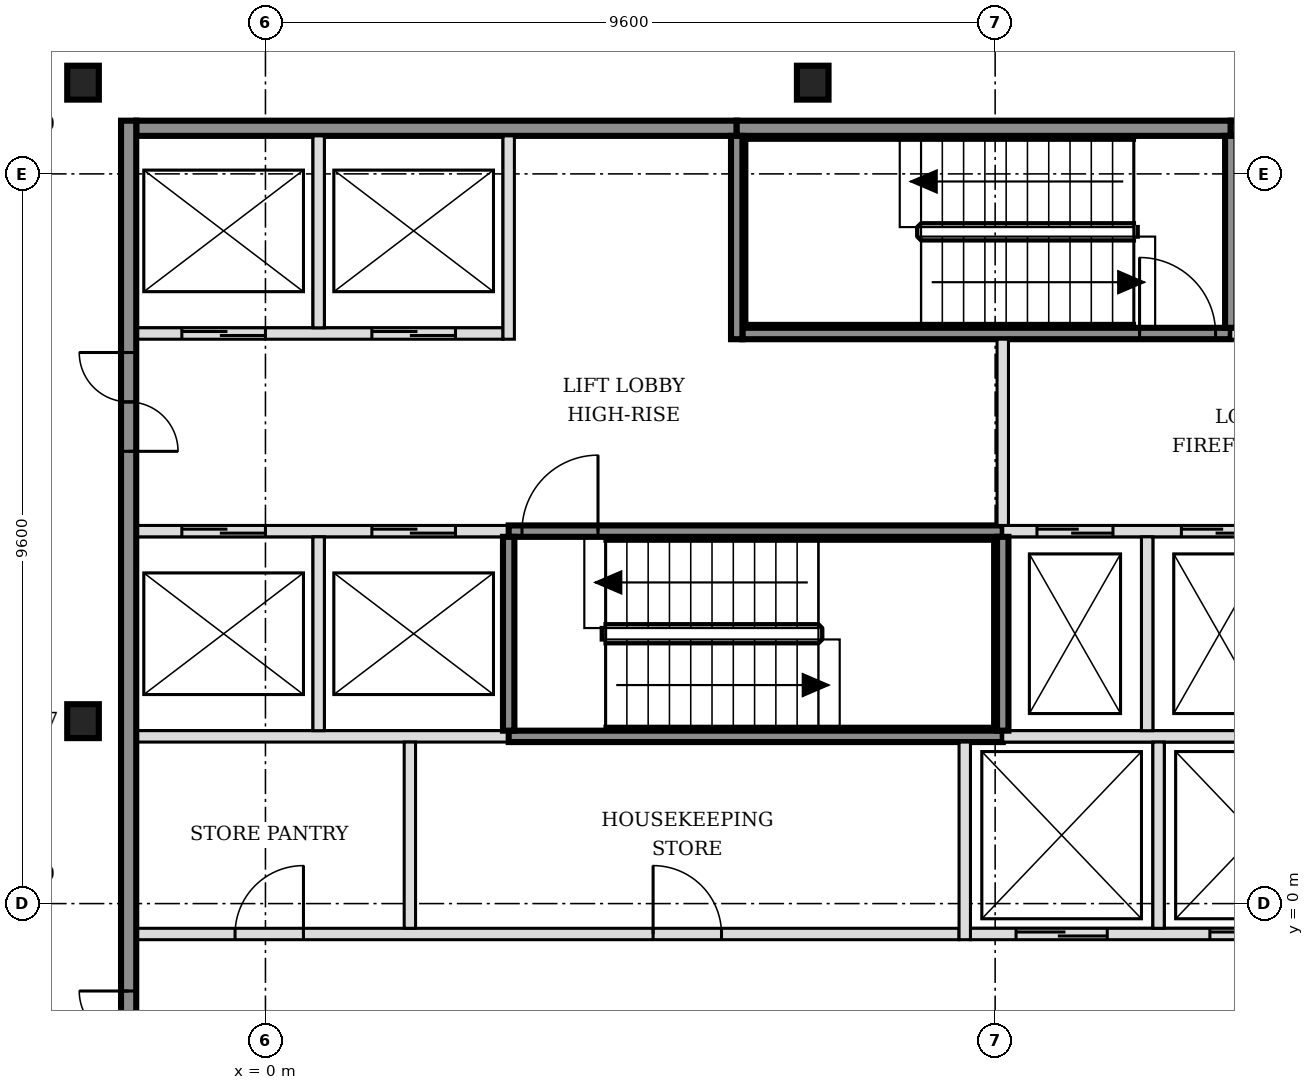
"""IFC4 building model, lengths in metres.
Left out: names, types, materials, properties, quantities, classifications, styles, units other than length and angle.
Written with IfcOpenShell. Run it as: python <this file> out.ifc"""

import sys

from ifc_helpers import new_model, si_unit, direction, frame, frame_2d, origin, origin_2d, place, context, subcontext, project, spatial, rectangle, i_section, extrude, element, fill, save


model = new_model("IFC4")
c1 = context("Model", 3, precision=1e-05, world=origin(), true_north=direction((0.0, 1.0)))
c2 = subcontext(c1, "Body", "Model", "MODEL_VIEW")
j1 = project(units=[si_unit("LENGTHUNIT", "METRE"), si_unit("PLANEANGLEUNIT", "RADIAN")], contexts=[c1])
p1 = place(None, origin())
s1 = spatial("IfcSite", under=j1, at=p1, CompositionType="ELEMENT")
p2 = place(p1, origin())
s2 = spatial("IfcBuilding", under=s1, at=p2, CompositionType="ELEMENT")
p3 = place(p2, frame((0.0, 0.0, 168.6)))
s3 = spatial("IfcBuildingStorey", under=s2, at=p3, CompositionType="ELEMENT", Elevation=168.6)
for number, where, z_axis, x_axis in (
    (1, (-2.4, 2.4, -0.15), (0.0, 0.0, 1.0), (1.0, 0.0, 0.0)),
    (2, (-2.4, 10.8, -0.15), (0.0, 0.0, 1.0), (1.0, 0.0, 0.0)),
    (3, (7.2, 10.8, -0.15), (0.0, 0.0, 1.0), (1.0, 0.0, 0.0)),
):
    element("IfcColumn", number, at=place(p3, frame(where, z_axis=z_axis, x_axis=x_axis)), inside=s3, PredefinedType="COLUMN", context=c2, shape_type="SweptSolid", body=[
        extrude(i_section(OverallWidth=0.416, OverallDepth=0.446, WebThickness=0.039, FlangeThickness=0.063, FilletRadius=0.015, at=origin_2d()), origin(), (0.0, 0.0, 1.0), 3.6),
    ])
p4 = place(p3, frame((-1.7, -0.4, 0.0), z_axis=(0.0, 0.0, 1.0), x_axis=(1.0, 0.0, 0.0)))
e4 = element("IfcWall", 4, at=p4, inside=s3, PredefinedType="PARTITIONING", context=c2, shape_type="SweptSolid", body=[
    extrude(rectangle(XDim=10.825, YDim=0.15, at=frame_2d((5.413, 0.0))), origin(), (0.0, 0.0, 1.0), 3.45),
])
p5 = place(p4, frame((1.3, 0.0, 0.0)))
e5 = element("IfcOpeningElement", 5, at=p5, cuts=e4, PredefinedType="OPENING", context=c2, shape_type="SweptSolid", body=[
    extrude(rectangle(XDim=0.9, YDim=2.1, at=frame_2d((0.45, 1.05))), frame((0.0, 0.085, 0.0), z_axis=(0.0, -1.0, 0.0), x_axis=(1.0, 0.0, 0.0)), (0.0, 0.0, 1.0), 0.17),
])
p6 = place(p4, frame((6.8, 0.0, 0.0)))
e6 = element("IfcOpeningElement", 6, at=p6, cuts=e4, PredefinedType="OPENING", context=c2, shape_type="SweptSolid", body=[
    extrude(rectangle(XDim=0.9, YDim=2.1, at=frame_2d((0.45, 1.05))), frame((0.0, 0.085, 0.0), z_axis=(0.0, -1.0, 0.0), x_axis=(1.0, 0.0, 0.0)), (0.0, 0.0, 1.0), 0.17),
])
p7 = place(p3, frame((9.275, -0.4, 0.0), z_axis=(0.0, 0.0, 1.0), x_axis=(1.0, 0.0, 0.0)))
e7 = element("IfcWall", 7, at=p7, inside=s3, PredefinedType="SOLIDWALL", context=c2, shape_type="SweptSolid", body=[
    extrude(rectangle(XDim=4.95, YDim=0.15, at=frame_2d((2.475, 0.0))), origin(), (0.0, 0.0, 1.0), 3.45),
])
p8 = place(p7, frame((0.6, 0.0, 0.0)))
e8 = element("IfcOpeningElement", 8, at=p8, cuts=e7, PredefinedType="OPENING", context=c2, shape_type="SweptSolid", body=[
    extrude(rectangle(XDim=1.2, YDim=2.1, at=frame_2d((0.6, 1.05))), frame((0.0, 0.085, 0.0), z_axis=(0.0, -1.0, 0.0), x_axis=(1.0, 0.0, 0.0)), (0.0, 0.0, 1.0), 0.17),
])
p9 = place(p7, frame((3.15, 0.0, 0.0)))
e9 = element("IfcOpeningElement", 9, at=p9, cuts=e7, PredefinedType="OPENING", context=c2, shape_type="SweptSolid", body=[
    extrude(rectangle(XDim=1.2, YDim=2.1, at=frame_2d((0.6, 1.05))), frame((0.0, 0.085, 0.0), z_axis=(0.0, -1.0, 0.0), x_axis=(1.0, 0.0, 0.0)), (0.0, 0.0, 1.0), 0.17),
])
p10 = place(p3, frame((-1.7, 2.2, 0.0), z_axis=(0.0, 0.0, 1.0), x_axis=(1.0, 0.0, 0.0)))
e10 = element("IfcWall", 10, at=p10, inside=s3, PredefinedType="SOLIDWALL", context=c2, shape_type="SweptSolid", body=[
    extrude(rectangle(XDim=4.9, YDim=0.15, at=frame_2d((2.45, 0.0))), origin(), (0.0, 0.0, 1.0), 3.45),
])
p11 = place(p3, frame((3.2, 2.2, 0.0), z_axis=(0.0, 0.0, 1.0), x_axis=(1.0, 0.0, 0.0)))
e11 = element("IfcWall", 11, at=p11, inside=s3, PredefinedType="SOLIDWALL", context=c2, shape_type="SweptSolid", body=[
    extrude(rectangle(XDim=6.5, YDim=0.15, at=frame_2d((3.25, 0.0))), origin(), (0.0, 0.0, 1.0), 3.45),
])
p12 = place(p3, frame((9.7, 2.2, 0.0), z_axis=(0.0, 0.0, 1.0), x_axis=(1.0, 0.0, 0.0)))
e12 = element("IfcWall", 12, at=p12, inside=s3, PredefinedType="SOLIDWALL", context=c2, shape_type="SweptSolid", body=[
    extrude(rectangle(XDim=4.525, YDim=0.15, at=frame_2d((2.263, 0.0))), origin(), (0.0, 0.0, 1.0), 3.45),
])
p13 = place(p3, frame((-1.7, 4.9, 0.0), z_axis=(0.0, 0.0, 1.0), x_axis=(1.0, 0.0, 0.0)))
e13 = element("IfcWall", 13, at=p13, inside=s3, PredefinedType="SOLIDWALL", context=c2, shape_type="SweptSolid", body=[
    extrude(rectangle(XDim=4.9, YDim=0.15, at=frame_2d((2.45, 0.0))), origin(), (0.0, 0.0, 1.0), 3.45),
])
p14 = place(p13, frame((0.6, 0.0, 0.0)))
e14 = element("IfcOpeningElement", 14, at=p14, cuts=e13, PredefinedType="OPENING", context=c2, shape_type="SweptSolid", body=[
    extrude(rectangle(XDim=1.1, YDim=2.1, at=frame_2d((0.55, 1.05))), frame((0.0, 0.085, 0.0), z_axis=(0.0, -1.0, 0.0), x_axis=(1.0, 0.0, 0.0)), (0.0, 0.0, 1.0), 0.17),
])
p15 = place(p13, frame((3.1, 0.0, 0.0)))
e15 = element("IfcOpeningElement", 15, at=p15, cuts=e13, PredefinedType="OPENING", context=c2, shape_type="SweptSolid", body=[
    extrude(rectangle(XDim=1.1, YDim=2.1, at=frame_2d((0.55, 1.05))), frame((0.0, 0.085, 0.0), z_axis=(0.0, -1.0, 0.0), x_axis=(1.0, 0.0, 0.0)), (0.0, 0.0, 1.0), 0.17),
])
p16 = place(p3, frame((3.2, 4.9, 0.0), z_axis=(0.0, 0.0, 1.0), x_axis=(1.0, 0.0, 0.0)))
e16 = element("IfcWall", 16, at=p16, inside=s3, PredefinedType="SOLIDWALL", context=c2, shape_type="SweptSolid", body=[
    extrude(rectangle(XDim=6.5, YDim=0.15, at=frame_2d((3.25, 0.0))), origin(), (0.0, 0.0, 1.0), 3.45),
])
p17 = place(p16, frame((0.175, 0.0, 0.0)))
e17 = element("IfcOpeningElement", 17, at=p17, cuts=e16, PredefinedType="OPENING", context=c2, shape_type="SweptSolid", body=[
    extrude(rectangle(XDim=1.0, YDim=2.1, at=frame_2d((0.5, 1.05))), frame((0.0, 0.085, 0.0), z_axis=(0.0, -1.0, 0.0), x_axis=(1.0, 0.0, 0.0)), (0.0, 0.0, 1.0), 0.17),
])
p18 = place(p3, frame((9.7, 4.9, 0.0), z_axis=(0.0, 0.0, 1.0), x_axis=(1.0, 0.0, 0.0)))
e18 = element("IfcWall", 18, at=p18, inside=s3, PredefinedType="SOLIDWALL", context=c2, shape_type="SweptSolid", body=[
    extrude(rectangle(XDim=6.4, YDim=0.15, at=frame_2d((3.2, 0.0))), origin(), (0.0, 0.0, 1.0), 3.45),
])
p19 = place(p18, frame((0.45, 0.0, 0.0)))
e19 = element("IfcOpeningElement", 19, at=p19, cuts=e18, PredefinedType="OPENING", context=c2, shape_type="SweptSolid", body=[
    extrude(rectangle(XDim=1.0, YDim=2.1, at=frame_2d((0.5, 1.05))), frame((0.0, 0.085, 0.0), z_axis=(0.0, -1.0, 0.0), x_axis=(1.0, 0.0, 0.0)), (0.0, 0.0, 1.0), 0.17),
])
p20 = place(p18, frame((2.35, 0.0, 0.0)))
e20 = element("IfcOpeningElement", 20, at=p20, cuts=e18, PredefinedType="OPENING", context=c2, shape_type="SweptSolid", body=[
    extrude(rectangle(XDim=1.0, YDim=2.1, at=frame_2d((0.5, 1.05))), frame((0.0, 0.085, 0.0), z_axis=(0.0, -1.0, 0.0), x_axis=(1.0, 0.0, 0.0)), (0.0, 0.0, 1.0), 0.17),
])
p21 = place(p18, frame((4.7, 0.0, 0.0)))
e21 = element("IfcOpeningElement", 21, at=p21, cuts=e18, PredefinedType="OPENING", context=c2, shape_type="SweptSolid", body=[
    extrude(rectangle(XDim=0.9, YDim=2.1, at=frame_2d((0.45, 1.05))), frame((0.0, 0.085, 0.0), z_axis=(0.0, -1.0, 0.0), x_axis=(1.0, 0.0, 0.0)), (0.0, 0.0, 1.0), 0.17),
])
p22 = place(p3, frame((-1.7, 7.5, 0.0), z_axis=(0.0, 0.0, 1.0), x_axis=(1.0, 0.0, 0.0)))
e22 = element("IfcWall", 22, at=p22, inside=s3, PredefinedType="SOLIDWALL", context=c2, shape_type="SweptSolid", body=[
    extrude(rectangle(XDim=4.825, YDim=0.15, at=frame_2d((2.413, 0.0))), origin(), (0.0, 0.0, 1.0), 3.45),
])
p23 = place(p22, frame((0.6, 0.0, 0.0)))
e23 = element("IfcOpeningElement", 23, at=p23, cuts=e22, PredefinedType="OPENING", context=c2, shape_type="SweptSolid", body=[
    extrude(rectangle(XDim=1.1, YDim=2.1, at=frame_2d((0.55, 1.05))), frame((0.0, 0.085, 0.0), z_axis=(0.0, -1.0, 0.0), x_axis=(1.0, 0.0, 0.0)), (0.0, 0.0, 1.0), 0.17),
])
p24 = place(p22, frame((3.1, 0.0, 0.0)))
e24 = element("IfcOpeningElement", 24, at=p24, cuts=e22, PredefinedType="OPENING", context=c2, shape_type="SweptSolid", body=[
    extrude(rectangle(XDim=1.1, YDim=2.1, at=frame_2d((0.55, 1.05))), frame((0.0, 0.085, 0.0), z_axis=(0.0, -1.0, 0.0), x_axis=(1.0, 0.0, 0.0)), (0.0, 0.0, 1.0), 0.17),
])
p25 = place(p3, frame((6.275, 7.5, 0.0), z_axis=(0.0, 0.0, 1.0), x_axis=(1.0, 0.0, 0.0)))
e25 = element("IfcWall", 25, at=p25, inside=s3, PredefinedType="SOLIDWALL", context=c2, shape_type="SweptSolid", body=[
    extrude(rectangle(XDim=6.425, YDim=0.15, at=frame_2d((3.212, 0.0))), origin(), (0.0, 0.0, 1.0), 3.45),
])
p26 = place(p25, frame((5.225, 0.0, 0.0)))
e26 = element("IfcOpeningElement", 26, at=p26, cuts=e25, PredefinedType="OPENING", context=c2, shape_type="SweptSolid", body=[
    extrude(rectangle(XDim=1.0, YDim=2.1, at=frame_2d((0.5, 1.05))), frame((0.0, 0.085, 0.0), z_axis=(0.0, -1.0, 0.0), x_axis=(1.0, 0.0, 0.0)), (0.0, 0.0, 1.0), 0.17),
])
p27 = place(p3, frame((12.7, 7.5, 0.0), z_axis=(0.0, 0.0, 1.0), x_axis=(1.0, 0.0, 0.0)))
e27 = element("IfcWall", 27, at=p27, inside=s3, PredefinedType="SOLIDWALL", context=c2, shape_type="SweptSolid", body=[
    extrude(rectangle(XDim=3.4, YDim=0.15, at=frame_2d((1.7, 0.0))), origin(), (0.0, 0.0, 1.0), 3.45),
])
p28 = place(p27, frame((1.3, 0.0, 0.0)))
e28 = element("IfcOpeningElement", 28, at=p28, cuts=e27, PredefinedType="OPENING", context=c2, shape_type="SweptSolid", body=[
    extrude(rectangle(XDim=0.9, YDim=2.1, at=frame_2d((0.45, 1.05))), frame((0.0, 0.085, 0.0), z_axis=(0.0, -1.0, 0.0), x_axis=(1.0, 0.0, 0.0)), (0.0, 0.0, 1.0), 0.17),
])
p29 = place(p3, frame((-1.7, 10.2, 0.0), z_axis=(0.0, 0.0, 1.0), x_axis=(1.0, 0.0, 0.0)))
e29 = element("IfcWall", 29, at=p29, inside=s3, PredefinedType="SOLIDWALL", context=c2, shape_type="SweptSolid", body=[
    extrude(rectangle(XDim=7.9, YDim=0.2, at=frame_2d((3.95, 0.0))), origin(), (0.0, 0.0, 1.0), 3.45),
])
p30 = place(p3, frame((6.2, 10.2, 0.0), z_axis=(0.0, 0.0, 1.0), x_axis=(1.0, 0.0, 0.0)))
e30 = element("IfcWall", 30, at=p30, inside=s3, PredefinedType="SOLIDWALL", context=c2, shape_type="SweptSolid", body=[
    extrude(rectangle(XDim=6.5, YDim=0.2, at=frame_2d((3.25, 0.0))), origin(), (0.0, 0.0, 1.0), 3.45),
])
p31 = place(p3, frame((12.7, 10.2, 0.0), z_axis=(0.0, 0.0, 1.0), x_axis=(1.0, 0.0, 0.0)))
e31 = element("IfcWall", 31, at=p31, inside=s3, PredefinedType="SOLIDWALL", context=c2, shape_type="SweptSolid", body=[
    extrude(rectangle(XDim=3.4, YDim=0.2, at=frame_2d((1.7, 0.0))), origin(), (0.0, 0.0, 1.0), 3.45),
])
p32 = place(p3, frame((-1.8, -5.5, 0.0), z_axis=(0.0, 0.0, 1.0), x_axis=(0.0, 1.0, 0.0)))
e32 = element("IfcWall", 32, at=p32, inside=s3, PredefinedType="SOLIDWALL", context=c2, shape_type="SweptSolid", body=[
    extrude(rectangle(XDim=15.8, YDim=0.2, at=frame_2d((7.9, 0.0))), origin(), (0.0, 0.0, 1.0), 3.45),
])
p33 = place(p32, frame((3.05, 0.0, 0.0)))
e33 = element("IfcOpeningElement", 33, at=p33, cuts=e32, PredefinedType="OPENING", context=c2, shape_type="SweptSolid", body=[
    extrude(rectangle(XDim=1.3, YDim=2.1, at=frame_2d((0.65, 1.05))), frame((0.0, 0.11, 0.0), z_axis=(0.0, -1.0, 0.0), x_axis=(1.0, 0.0, 0.0)), (0.0, 0.0, 1.0), 0.22),
])
p34 = place(p32, frame((11.45, 0.0, 0.0)))
e34 = element("IfcOpeningElement", 34, at=p34, cuts=e32, PredefinedType="OPENING", context=c2, shape_type="SweptSolid", body=[
    extrude(rectangle(XDim=1.3, YDim=2.1, at=frame_2d((0.65, 1.05))), frame((0.0, 0.11, 0.0), z_axis=(0.0, -1.0, 0.0), x_axis=(1.0, 0.0, 0.0)), (0.0, 0.0, 1.0), 0.22),
])
p35 = place(p3, frame((0.7, 2.275, 0.0), z_axis=(0.0, 0.0, 1.0), x_axis=(0.0, 1.0, 0.0)))
e35 = element("IfcWall", 35, at=p35, inside=s3, PredefinedType="SOLIDWALL", context=c2, shape_type="SweptSolid", body=[
    extrude(rectangle(XDim=2.55, YDim=0.15, at=frame_2d((1.275, 0.0))), origin(), (0.0, 0.0, 1.0), 3.45),
])
p36 = place(p3, frame((0.7, 7.575, 0.0), z_axis=(0.0, 0.0, 1.0), x_axis=(0.0, 1.0, 0.0)))
e36 = element("IfcWall", 36, at=p36, inside=s3, PredefinedType="SOLIDWALL", context=c2, shape_type="SweptSolid", body=[
    extrude(rectangle(XDim=2.525, YDim=0.15, at=frame_2d((1.263, 0.0))), origin(), (0.0, 0.0, 1.0), 3.45),
])
p37 = place(p3, frame((1.9, -0.325, 0.0), z_axis=(0.0, 0.0, 1.0), x_axis=(0.0, 1.0, 0.0)))
e37 = element("IfcWall", 37, at=p37, inside=s3, PredefinedType="PARTITIONING", context=c2, shape_type="SweptSolid", body=[
    extrude(rectangle(XDim=2.45, YDim=0.15, at=frame_2d((1.225, 0.0))), origin(), (0.0, 0.0, 1.0), 3.45),
])
p38 = place(p3, frame((3.2, 2.275, 0.0), z_axis=(0.0, 0.0, 1.0), x_axis=(0.0, 1.0, 0.0)))
e38 = element("IfcWall", 38, at=p38, inside=s3, PredefinedType="SOLIDWALL", context=c2, shape_type="SweptSolid", body=[
    extrude(rectangle(XDim=2.55, YDim=0.15, at=frame_2d((1.275, 0.0))), origin(), (0.0, 0.0, 1.0), 3.45),
])
for number, where, z_axis, x_axis in (
    (39, (3.2, 7.425, 0.0), (0.0, 0.0, 1.0), (0.0, 1.0, 0.0)),
    (40, (6.2, 7.425, 0.0), (0.0, 0.0, 1.0), (0.0, 1.0, 0.0)),
):
    element("IfcWall", number, at=place(p3, frame(where, z_axis=z_axis, x_axis=x_axis)), inside=s3, PredefinedType="SOLIDWALL", context=c2, shape_type="SweptSolid", body=[
        extrude(rectangle(XDim=2.675, YDim=0.15, at=frame_2d((1.337, 0.0))), origin(), (0.0, 0.0, 1.0), 3.45),
    ])
p39 = place(p3, frame((9.2, -0.475, 0.0), z_axis=(0.0, 0.0, 1.0), x_axis=(0.0, 1.0, 0.0)))
e41 = element("IfcWall", 41, at=p39, inside=s3, PredefinedType="SOLIDWALL", context=c2, shape_type="SweptSolid", body=[
    extrude(rectangle(XDim=2.6, YDim=0.15, at=frame_2d((1.3, 0.0))), origin(), (0.0, 0.0, 1.0), 3.45),
])
p40 = place(p3, frame((9.7, 2.275, 0.0), z_axis=(0.0, 0.0, 1.0), x_axis=(0.0, 1.0, 0.0)))
e42 = element("IfcWall", 42, at=p40, inside=s3, PredefinedType="SOLIDWALL", context=c2, shape_type="SweptSolid", body=[
    extrude(rectangle(XDim=2.55, YDim=0.15, at=frame_2d((1.275, 0.0))), origin(), (0.0, 0.0, 1.0), 3.45),
])
p41 = place(p3, frame((9.7, 4.975, 0.0), z_axis=(0.0, 0.0, 1.0), x_axis=(0.0, 1.0, 0.0)))
e43 = element("IfcWall", 43, at=p41, inside=s3, PredefinedType="SOLIDWALL", context=c2, shape_type="SweptSolid", body=[
    extrude(rectangle(XDim=2.45, YDim=0.15, at=frame_2d((1.225, 0.0))), origin(), (0.0, 0.0, 1.0), 3.45),
])
p42 = place(p3, frame((11.6, 2.275, 0.0), z_axis=(0.0, 0.0, 1.0), x_axis=(0.0, 1.0, 0.0)))
e44 = element("IfcWall", 44, at=p42, inside=s3, PredefinedType="SOLIDWALL", context=c2, shape_type="SweptSolid", body=[
    extrude(rectangle(XDim=2.55, YDim=0.15, at=frame_2d((1.275, 0.0))), origin(), (0.0, 0.0, 1.0), 3.45),
])
p43 = place(p3, frame((11.75, -0.325, 0.0), z_axis=(0.0, 0.0, 1.0), x_axis=(0.0, 1.0, 0.0)))
e45 = element("IfcWall", 45, at=p43, inside=s3, PredefinedType="SOLIDWALL", context=c2, shape_type="SweptSolid", body=[
    extrude(rectangle(XDim=2.45, YDim=0.15, at=frame_2d((1.225, 0.0))), origin(), (0.0, 0.0, 1.0), 3.45),
])
p44 = place(p3, frame((12.7, 7.575, 0.0), z_axis=(0.0, 0.0, 1.0), x_axis=(0.0, 1.0, 0.0)))
e46 = element("IfcWall", 46, at=p44, inside=s3, PredefinedType="SOLIDWALL", context=c2, shape_type="SweptSolid", body=[
    extrude(rectangle(XDim=2.525, YDim=0.15, at=frame_2d((1.263, 0.0))), origin(), (0.0, 0.0, 1.0), 3.45),
])
p45 = place(p8, origin())
e47 = element("IfcDoor", 47, at=p45, inside=s3, OperationType="DOUBLE_DOOR_SLIDING", PredefinedType="DOOR", context=c2, shape_type="SweptSolid", body=[
    extrude(rectangle(XDim=1.2, YDim=2.1, at=frame_2d((0.6, 1.05))), frame((0.0, 0.025, 0.0), z_axis=(0.0, -1.0, 0.0), x_axis=(1.0, 0.0, 0.0)), (0.0, 0.0, 1.0), 0.05),
])
fill(e8, e47)
p46 = place(p9, origin())
e48 = element("IfcDoor", 48, at=p46, inside=s3, OperationType="DOUBLE_DOOR_SLIDING", PredefinedType="DOOR", context=c2, shape_type="SweptSolid", body=[
    extrude(rectangle(XDim=1.2, YDim=2.1, at=frame_2d((0.6, 1.05))), frame((0.0, 0.025, 0.0), z_axis=(0.0, -1.0, 0.0), x_axis=(1.0, 0.0, 0.0)), (0.0, 0.0, 1.0), 0.05),
])
fill(e9, e48)
p47 = place(p14, origin())
e49 = element("IfcDoor", 49, at=p47, inside=s3, OperationType="DOUBLE_DOOR_SLIDING", PredefinedType="DOOR", context=c2, shape_type="SweptSolid", body=[
    extrude(rectangle(XDim=1.1, YDim=2.1, at=frame_2d((0.55, 1.05))), frame((0.0, 0.025, 0.0), z_axis=(0.0, -1.0, 0.0), x_axis=(1.0, 0.0, 0.0)), (0.0, 0.0, 1.0), 0.05),
])
fill(e14, e49)
p48 = place(p15, origin())
e50 = element("IfcDoor", 50, at=p48, inside=s3, OperationType="DOUBLE_DOOR_SLIDING", PredefinedType="DOOR", context=c2, shape_type="SweptSolid", body=[
    extrude(rectangle(XDim=1.1, YDim=2.1, at=frame_2d((0.55, 1.05))), frame((0.0, 0.025, 0.0), z_axis=(0.0, -1.0, 0.0), x_axis=(1.0, 0.0, 0.0)), (0.0, 0.0, 1.0), 0.05),
])
fill(e15, e50)
p49 = place(p23, origin())
e51 = element("IfcDoor", 51, at=p49, inside=s3, OperationType="DOUBLE_DOOR_SLIDING", PredefinedType="DOOR", context=c2, shape_type="SweptSolid", body=[
    extrude(rectangle(XDim=1.1, YDim=2.1, at=frame_2d((0.55, 1.05))), frame((0.0, 0.025, 0.0), z_axis=(0.0, -1.0, 0.0), x_axis=(1.0, 0.0, 0.0)), (0.0, 0.0, 1.0), 0.05),
])
fill(e23, e51)
p50 = place(p24, origin())
e52 = element("IfcDoor", 52, at=p50, inside=s3, OperationType="DOUBLE_DOOR_SLIDING", PredefinedType="DOOR", context=c2, shape_type="SweptSolid", body=[
    extrude(rectangle(XDim=1.1, YDim=2.1, at=frame_2d((0.55, 1.05))), frame((0.0, 0.025, 0.0), z_axis=(0.0, -1.0, 0.0), x_axis=(1.0, 0.0, 0.0)), (0.0, 0.0, 1.0), 0.05),
])
fill(e24, e52)
p51 = place(p19, origin())
e53 = element("IfcDoor", 53, at=p51, inside=s3, OperationType="DOUBLE_DOOR_SLIDING", PredefinedType="DOOR", context=c2, shape_type="SweptSolid", body=[
    extrude(rectangle(XDim=1.0, YDim=2.1, at=frame_2d((0.5, 1.05))), frame((0.0, 0.025, 0.0), z_axis=(0.0, -1.0, 0.0), x_axis=(1.0, 0.0, 0.0)), (0.0, 0.0, 1.0), 0.05),
])
fill(e19, e53)
p52 = place(p20, origin())
e54 = element("IfcDoor", 54, at=p52, inside=s3, OperationType="DOUBLE_DOOR_SLIDING", PredefinedType="DOOR", context=c2, shape_type="SweptSolid", body=[
    extrude(rectangle(XDim=1.0, YDim=2.1, at=frame_2d((0.5, 1.05))), frame((0.0, 0.025, 0.0), z_axis=(0.0, -1.0, 0.0), x_axis=(1.0, 0.0, 0.0)), (0.0, 0.0, 1.0), 0.05),
])
fill(e20, e54)
p53 = place(p17, origin())
e55 = element("IfcDoor", 55, at=p53, inside=s3, OperationType="SINGLE_SWING_RIGHT", PredefinedType="DOOR", context=c2, shape_type="SweptSolid", body=[
    extrude(rectangle(XDim=1.0, YDim=2.1, at=frame_2d((0.5, 1.05))), frame((0.0, 0.025, 0.0), z_axis=(0.0, -1.0, 0.0), x_axis=(1.0, 0.0, 0.0)), (0.0, 0.0, 1.0), 0.05),
])
fill(e17, e55)
p54 = place(p26, origin())
e56 = element("IfcDoor", 56, at=p54, inside=s3, OperationType="SINGLE_SWING_LEFT", PredefinedType="DOOR", context=c2, shape_type="SweptSolid", body=[
    extrude(rectangle(XDim=1.0, YDim=2.1, at=frame_2d((0.5, 1.05))), frame((0.0, 0.025, 0.0), z_axis=(0.0, -1.0, 0.0), x_axis=(1.0, 0.0, 0.0)), (0.0, 0.0, 1.0), 0.05),
])
fill(e26, e56)
p55 = place(p33, origin())
e57 = element("IfcDoor", 57, at=p55, inside=s3, OperationType="DOUBLE_DOOR_SINGLE_SWING", PredefinedType="DOOR", context=c2, shape_type="SweptSolid", body=[
    extrude(rectangle(XDim=1.3, YDim=2.1, at=frame_2d((0.65, 1.05))), frame((0.0, 0.025, 0.0), z_axis=(0.0, -1.0, 0.0), x_axis=(1.0, 0.0, 0.0)), (0.0, 0.0, 1.0), 0.05),
])
fill(e33, e57)
p56 = place(p34, origin())
e58 = element("IfcDoor", 58, at=p56, inside=s3, OperationType="DOUBLE_DOOR_SINGLE_SWING", PredefinedType="DOOR", context=c2, shape_type="SweptSolid", body=[
    extrude(rectangle(XDim=1.3, YDim=2.1, at=frame_2d((0.65, 1.05))), frame((0.0, 0.025, 0.0), z_axis=(0.0, -1.0, 0.0), x_axis=(1.0, 0.0, 0.0)), (0.0, 0.0, 1.0), 0.05),
])
fill(e34, e58)
p57 = place(p5, origin())
e59 = element("IfcDoor", 59, at=p57, inside=s3, OperationType="SINGLE_SWING_RIGHT", PredefinedType="DOOR", context=c2, shape_type="SweptSolid", body=[
    extrude(rectangle(XDim=0.9, YDim=2.1, at=frame_2d((0.45, 1.05))), frame((0.0, 0.025, 0.0), z_axis=(0.0, -1.0, 0.0), x_axis=(1.0, 0.0, 0.0)), (0.0, 0.0, 1.0), 0.05),
])
fill(e5, e59)
p58 = place(p6, origin())
e60 = element("IfcDoor", 60, at=p58, inside=s3, OperationType="SINGLE_SWING_LEFT", PredefinedType="DOOR", context=c2, shape_type="SweptSolid", body=[
    extrude(rectangle(XDim=0.9, YDim=2.1, at=frame_2d((0.45, 1.05))), frame((0.0, 0.025, 0.0), z_axis=(0.0, -1.0, 0.0), x_axis=(1.0, 0.0, 0.0)), (0.0, 0.0, 1.0), 0.05),
])
fill(e6, e60)
save(model, sys.argv[1])
